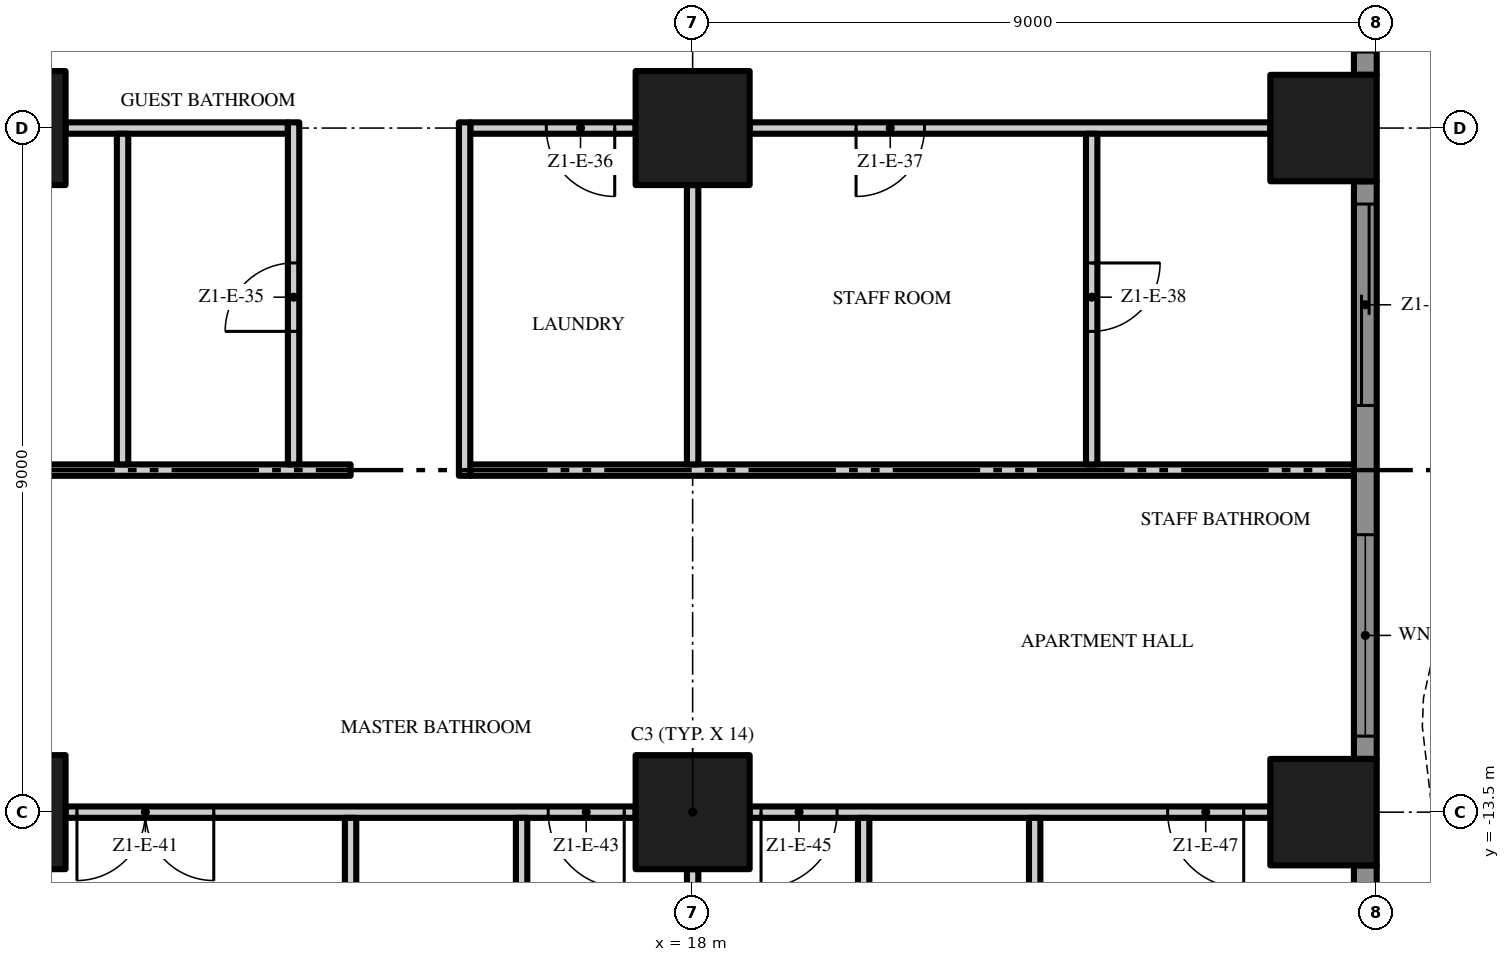
"""IFC4 building model, lengths in metres.
Left out: names, types, materials, properties, quantities, classifications, styles, units other than length and angle.
Written with IfcOpenShell. Run it as: python <this file> out.ifc"""

import sys

from ifc_helpers import new_model, si_unit, direction, frame, frame_2d, origin, origin_2d, place, context, subcontext, project, spatial, polyline, rectangle, outline, extrude, element, fill, save


model = new_model("IFC4")
c1 = context("Model", 3, precision=1e-05, world=origin(), true_north=direction((0.0, 1.0)))
c2 = subcontext(c1, "Body", "Model", "MODEL_VIEW")
j1 = project(units=[si_unit("LENGTHUNIT", "METRE"), si_unit("PLANEANGLEUNIT", "RADIAN")], contexts=[c1])
p1 = place(None, origin())
s1 = spatial("IfcSite", under=j1, at=p1, CompositionType="ELEMENT")
p2 = place(p1, origin())
s2 = spatial("IfcBuilding", under=s1, at=p2, CompositionType="ELEMENT")
p3 = place(p2, frame((0.0, 0.0, 56.8)))
s3 = spatial("IfcBuildingStorey", under=s2, at=p3, CompositionType="ELEMENT", Elevation=56.8)
for number, where, z_axis, x_axis in (
    (1, (18.0, -13.5, 0.0), (0.0, 0.0, 1.0), (1.0, 0.0, 0.0)),
    (2, (18.0, -4.5, 0.0), (0.0, 0.0, 1.0), (1.0, 0.0, 0.0)),
):
    element("IfcColumn", number, at=place(p3, frame(where, z_axis=z_axis, x_axis=x_axis)), inside=s3, PredefinedType="COLUMN", context=c2, shape_type="SweptSolid", body=[
        extrude(rectangle(XDim=1.5, YDim=1.5, at=origin_2d()), origin(), (0.0, 0.0, 1.0), 3.5),
    ])
for number, where, z_axis, x_axis in (
    (3, (26.3, -13.5, 0.0), (0.0, 0.0, 1.0), (1.0, 0.0, 0.0)),
    (4, (26.3, -4.5, 0.0), (0.0, 0.0, 1.0), (1.0, 0.0, 0.0)),
):
    element("IfcColumn", number, at=place(p3, frame(where, z_axis=z_axis, x_axis=x_axis)), inside=s3, PredefinedType="COLUMN", context=c2, shape_type="SweptSolid", body=[
        extrude(rectangle(XDim=1.4, YDim=1.4, at=origin_2d()), origin(), (0.0, 0.0, 1.0), 3.5),
    ])
for number, where, z_axis, x_axis in (
    (5, (9.0, -13.5, 0.0), (0.0, 0.0, 1.0), (1.0, 0.0, 0.0)),
    (6, (9.0, -4.5, 0.0), (0.0, 0.0, 1.0), (1.0, 0.0, 0.0)),
):
    element("IfcColumn", number, at=place(p3, frame(where, z_axis=z_axis, x_axis=x_axis)), inside=s3, PredefinedType="COLUMN", context=c2, shape_type="SweptSolid", body=[
        extrude(rectangle(XDim=1.5, YDim=1.5, at=origin_2d()), origin(), (0.0, 0.0, 1.0), 3.5),
    ])
p4 = place(p3, frame((26.85, -14.2, 0.0), z_axis=(0.0, 0.0, 1.0), x_axis=(0.0, -1.0, 0.0)))
e7 = element("IfcWall", 7, at=p4, inside=s3, PredefinedType="SOLIDWALL", context=c2, shape_type="SweptSolid", body=[
    extrude(rectangle(XDim=3.5, YDim=0.3, at=frame_2d((1.75, 0.0))), origin(), (0.0, 0.0, 1.0), 3.5),
])
p5 = place(p4, frame((0.3, 0.0, 0.45)))
e8 = element("IfcOpeningElement", 8, at=p5, cuts=e7, PredefinedType="OPENING", context=c2, shape_type="SweptSolid", body=[
    extrude(rectangle(XDim=2.65, YDim=2.65, at=frame_2d((1.325, 1.325))), frame((0.0, 0.16, 0.0), z_axis=(0.0, -1.0, 0.0), x_axis=(1.0, 0.0, 0.0)), (0.0, 0.0, 1.0), 0.32),
])
p6 = place(p3, frame((26.85, -5.2, 0.0), z_axis=(0.0, 0.0, 1.0), x_axis=(0.0, -1.0, 0.0)))
e9 = element("IfcWall", 9, at=p6, inside=s3, PredefinedType="SOLIDWALL", context=c2, shape_type="SweptSolid", body=[
    extrude(rectangle(XDim=7.6, YDim=0.3, at=frame_2d((3.8, 0.0))), origin(), (0.0, 0.0, 1.0), 3.5),
])
p7 = place(p6, frame((4.65, 0.0, 0.45)))
e10 = element("IfcOpeningElement", 10, at=p7, cuts=e9, PredefinedType="OPENING", context=c2, shape_type="SweptSolid", body=[
    extrude(rectangle(XDim=2.65, YDim=2.65, at=frame_2d((1.325, 1.325))), frame((0.0, 0.16, 0.0), z_axis=(0.0, -1.0, 0.0), x_axis=(1.0, 0.0, 0.0)), (0.0, 0.0, 1.0), 0.32),
])
p8 = place(p6, frame((0.3, 0.0, 0.0)))
e11 = element("IfcOpeningElement", 11, at=p8, cuts=e9, PredefinedType="OPENING", context=c2, shape_type="SweptSolid", body=[
    extrude(rectangle(XDim=2.65, YDim=2.4, at=frame_2d((1.325, 1.2))), frame((0.0, 0.16, 0.0), z_axis=(0.0, -1.0, 0.0), x_axis=(1.0, 0.0, 0.0)), (0.0, 0.0, 1.0), 0.32),
])
p9 = place(p3, frame((26.85, 3.8, 0.0), z_axis=(0.0, 0.0, 1.0), x_axis=(0.0, -1.0, 0.0)))
e12 = element("IfcWall", 12, at=p9, inside=s3, PredefinedType="SOLIDWALL", context=c2, shape_type="SweptSolid", body=[
    extrude(rectangle(XDim=7.6, YDim=0.3, at=frame_2d((3.8, 0.0))), origin(), (0.0, 0.0, 1.0), 3.5),
])
p10 = place(p9, frame((4.65, 0.0, 0.0)))
e13 = element("IfcOpeningElement", 13, at=p10, cuts=e12, PredefinedType="OPENING", context=c2, shape_type="SweptSolid", body=[
    extrude(rectangle(XDim=2.65, YDim=2.4, at=frame_2d((1.325, 1.2))), frame((0.0, 0.16, 0.0), z_axis=(0.0, -1.0, 0.0), x_axis=(1.0, 0.0, 0.0)), (0.0, 0.0, 1.0), 0.32),
])
p11 = place(p9, frame((0.3, 0.0, 0.45)))
e14 = element("IfcOpeningElement", 14, at=p11, cuts=e12, PredefinedType="OPENING", context=c2, shape_type="SweptSolid", body=[
    extrude(rectangle(XDim=2.65, YDim=2.65, at=frame_2d((1.325, 1.325))), frame((0.0, 0.16, 0.0), z_axis=(0.0, -1.0, 0.0), x_axis=(1.0, 0.0, 0.0)), (0.0, 0.0, 1.0), 0.32),
])
p12 = place(p3, origin())
e15 = element("IfcWall", 15, at=p12, inside=s3, PredefinedType="USERDEFINED", context=c2, shape_type="SweptSolid", body=[
    extrude(outline(polyline([(29.649, -18.0), (28.988, -16.5), (28.255, -15.0), (27.731, -13.5), (27.6, -12.375), (27.615, -12.0), (27.951, -10.5), (28.612, -9.0), (29.345, -7.5), (29.869, -6.0), (30.0, -4.875), (29.985, -4.5), (29.649, -3.0), (28.988, -1.5), (28.255, 0.0), (27.731, 1.5), (27.6, 2.625), (27.615, 3.0), (27.951, 4.5), (28.612, 6.0), (29.345, 7.5), (29.869, 9.0), (30.0, 10.125), (29.985, 10.5), (29.649, 12.0), (28.988, 13.5), (28.255, 15.0), (27.731, 16.5), (27.6, 17.625), (27.615, 18.0), (27.365, 18.01), (27.349, 17.615), (27.486, 16.444), (28.024, 14.904), (28.761, 13.395), (29.41, 11.921), (29.736, 10.467), (29.749, 10.135), (29.624, 9.056), (29.114, 7.596), (28.385, 6.105), (27.713, 4.579), (27.366, 3.033), (27.349, 2.615), (27.486, 1.444), (28.024, -0.096), (28.761, -1.605), (29.41, -3.079), (29.736, -4.533), (29.749, -4.865), (29.624, -5.944), (29.114, -7.404), (28.385, -8.895), (27.713, -10.421), (27.366, -11.967), (27.349, -12.385), (27.486, -13.556), (28.024, -15.096), (28.761, -16.605), (29.42, -18.101), (29.649, -18.0)])), origin(), (0.0, 0.0, 1.0), 0.9),
])
p13 = place(p3, frame((17.25, -13.5, 0.0), z_axis=(0.0, 0.0, 1.0), x_axis=(-1.0, 0.0, 0.0)))
e16 = element("IfcWall", 16, at=p13, inside=s3, PredefinedType="PARTITIONING", context=c2, shape_type="SweptSolid", body=[
    extrude(rectangle(XDim=7.5, YDim=0.15, at=frame_2d((3.75, 0.0))), origin(), (0.0, 0.0, 1.0), 3.5),
])
p14 = place(p13, frame((5.55, 0.0, 0.0)))
e17 = element("IfcOpeningElement", 17, at=p14, cuts=e16, PredefinedType="OPENING", context=c2, shape_type="SweptSolid", body=[
    extrude(rectangle(XDim=1.8, YDim=2.4, at=frame_2d((0.9, 1.2))), frame((0.0, 0.085, 0.0), z_axis=(0.0, -1.0, 0.0), x_axis=(1.0, 0.0, 0.0)), (0.0, 0.0, 1.0), 0.17),
])
p15 = place(p13, frame((0.15, 0.0, 0.0)))
e18 = element("IfcOpeningElement", 18, at=p15, cuts=e16, PredefinedType="OPENING", context=c2, shape_type="SweptSolid", body=[
    extrude(rectangle(XDim=1.0, YDim=2.4, at=frame_2d((0.5, 1.2))), frame((0.0, 0.085, 0.0), z_axis=(0.0, -1.0, 0.0), x_axis=(1.0, 0.0, 0.0)), (0.0, 0.0, 1.0), 0.17),
])
p16 = place(p3, frame((25.6, -13.5, 0.0), z_axis=(0.0, 0.0, 1.0), x_axis=(-1.0, 0.0, 0.0)))
e19 = element("IfcWall", 19, at=p16, inside=s3, PredefinedType="PARTITIONING", context=c2, shape_type="SweptSolid", body=[
    extrude(rectangle(XDim=6.85, YDim=0.15, at=frame_2d((3.425, 0.0))), origin(), (0.0, 0.0, 1.0), 3.5),
])
p17 = place(p16, frame((5.7, 0.0, 0.0)))
e20 = element("IfcOpeningElement", 20, at=p17, cuts=e19, PredefinedType="OPENING", context=c2, shape_type="SweptSolid", body=[
    extrude(rectangle(XDim=1.0, YDim=2.4, at=frame_2d((0.5, 1.2))), frame((0.0, 0.085, 0.0), z_axis=(0.0, -1.0, 0.0), x_axis=(1.0, 0.0, 0.0)), (0.0, 0.0, 1.0), 0.17),
])
p18 = place(p16, frame((0.35, 0.0, 0.0)))
e21 = element("IfcOpeningElement", 21, at=p18, cuts=e19, PredefinedType="OPENING", context=c2, shape_type="SweptSolid", body=[
    extrude(rectangle(XDim=1.0, YDim=2.4, at=frame_2d((0.5, 1.2))), frame((0.0, 0.085, 0.0), z_axis=(0.0, -1.0, 0.0), x_axis=(1.0, 0.0, 0.0)), (0.0, 0.0, 1.0), 0.17),
])
p19 = place(p3, frame((0.1, -9.0, 0.0), z_axis=(0.0, 0.0, 1.0), x_axis=(1.0, 0.0, 0.0)))
e22 = element("IfcWall", 22, at=p19, inside=s3, PredefinedType="PARTITIONING", context=c2, shape_type="SweptSolid", body=[
    extrude(rectangle(XDim=13.4, YDim=0.15, at=frame_2d((6.7, 0.0))), origin(), (0.0, 0.0, 1.0), 3.5),
])
p20 = place(p19, frame((0.4, 0.0, 0.0)))
e23 = element("IfcOpeningElement", 23, at=p20, cuts=e22, PredefinedType="OPENING", context=c2, shape_type="SweptSolid", body=[
    extrude(rectangle(XDim=0.8, YDim=2.0, at=frame_2d((0.4, 1.0))), frame((0.0, 0.085, 0.0), z_axis=(0.0, -1.0, 0.0), x_axis=(1.0, 0.0, 0.0)), (0.0, 0.0, 1.0), 0.17),
])
p21 = place(p19, frame((6.9, 0.0, 0.0)))
e24 = element("IfcOpeningElement", 24, at=p21, cuts=e22, PredefinedType="OPENING", context=c2, shape_type="SweptSolid", body=[
    extrude(rectangle(XDim=1.0, YDim=2.4, at=frame_2d((0.5, 1.2))), frame((0.0, 0.085, 0.0), z_axis=(0.0, -1.0, 0.0), x_axis=(1.0, 0.0, 0.0)), (0.0, 0.0, 1.0), 0.17),
])
p22 = place(p3, frame((15.075, -9.0, 0.0), z_axis=(0.0, 0.0, 1.0), x_axis=(1.0, 0.0, 0.0)))
e25 = element("IfcWall", 25, at=p22, inside=s3, PredefinedType="PARTITIONING", context=c2, shape_type="SweptSolid", body=[
    extrude(rectangle(XDim=11.625, YDim=0.15, at=frame_2d((5.812, 0.0))), origin(), (0.0, 0.0, 1.0), 3.5),
])
p23 = place(p3, frame((9.75, -4.5, 0.0), z_axis=(0.0, 0.0, 1.0), x_axis=(1.0, 0.0, 0.0)))
e26 = element("IfcWall", 26, at=p23, inside=s3, PredefinedType="PARTITIONING", context=c2, shape_type="SweptSolid", body=[
    extrude(rectangle(XDim=2.925, YDim=0.15, at=frame_2d((1.462, 0.0))), origin(), (0.0, 0.0, 1.0), 3.5),
])
p24 = place(p3, frame((17.25, -4.5, 0.0), z_axis=(0.0, 0.0, 1.0), x_axis=(-1.0, 0.0, 0.0)))
e27 = element("IfcWall", 27, at=p24, inside=s3, PredefinedType="PARTITIONING", context=c2, shape_type="SweptSolid", body=[
    extrude(rectangle(XDim=2.175, YDim=0.15, at=frame_2d((1.087, 0.0))), origin(), (0.0, 0.0, 1.0), 3.5),
])
p25 = place(p24, frame((0.275, 0.0, 0.0)))
e28 = element("IfcOpeningElement", 28, at=p25, cuts=e27, PredefinedType="OPENING", context=c2, shape_type="SweptSolid", body=[
    extrude(rectangle(XDim=0.9, YDim=2.1, at=frame_2d((0.45, 1.05))), frame((0.0, 0.085, 0.0), z_axis=(0.0, -1.0, 0.0), x_axis=(1.0, 0.0, 0.0)), (0.0, 0.0, 1.0), 0.17),
])
p26 = place(p3, frame((25.6, -4.5, 0.0), z_axis=(0.0, 0.0, 1.0), x_axis=(-1.0, 0.0, 0.0)))
e29 = element("IfcWall", 29, at=p26, inside=s3, PredefinedType="PARTITIONING", context=c2, shape_type="SweptSolid", body=[
    extrude(rectangle(XDim=6.85, YDim=0.15, at=frame_2d((3.425, 0.0))), origin(), (0.0, 0.0, 1.0), 3.5),
])
p27 = place(p26, frame((4.55, 0.0, 0.0)))
e30 = element("IfcOpeningElement", 30, at=p27, cuts=e29, PredefinedType="OPENING", context=c2, shape_type="SweptSolid", body=[
    extrude(rectangle(XDim=0.9, YDim=2.1, at=frame_2d((0.45, 1.05))), frame((0.0, 0.085, 0.0), z_axis=(0.0, -1.0, 0.0), x_axis=(1.0, 0.0, 0.0)), (0.0, 0.0, 1.0), 0.17),
])
p28 = place(p3, frame((10.5, -8.925, 0.0), z_axis=(0.0, 0.0, 1.0), x_axis=(0.0, 1.0, 0.0)))
e31 = element("IfcWall", 31, at=p28, inside=s3, PredefinedType="PARTITIONING", context=c2, shape_type="SweptSolid", body=[
    extrude(rectangle(XDim=4.35, YDim=0.15, at=frame_2d((2.175, 0.0))), origin(), (0.0, 0.0, 1.0), 3.5),
])
p29 = place(p3, frame((12.75, -8.925, 0.0), z_axis=(0.0, 0.0, 1.0), x_axis=(0.0, 1.0, 0.0)))
e32 = element("IfcWall", 32, at=p29, inside=s3, PredefinedType="PARTITIONING", context=c2, shape_type="SweptSolid", body=[
    extrude(rectangle(XDim=4.5, YDim=0.15, at=frame_2d((2.25, 0.0))), origin(), (0.0, 0.0, 1.0), 3.5),
])
p30 = place(p29, frame((1.75, 0.0, 0.0)))
e33 = element("IfcOpeningElement", 33, at=p30, cuts=e32, PredefinedType="OPENING", context=c2, shape_type="SweptSolid", body=[
    extrude(rectangle(XDim=0.9, YDim=2.1, at=frame_2d((0.45, 1.05))), frame((0.0, 0.085, 0.0), z_axis=(0.0, -1.0, 0.0), x_axis=(1.0, 0.0, 0.0)), (0.0, 0.0, 1.0), 0.17),
])
p31 = place(p3, frame((13.5, -22.2, 0.0), z_axis=(0.0, 0.0, 1.0), x_axis=(0.0, 1.0, 0.0)))
e34 = element("IfcWall", 34, at=p31, inside=s3, PredefinedType="PARTITIONING", context=c2, shape_type="SweptSolid", body=[
    extrude(rectangle(XDim=8.625, YDim=0.15, at=frame_2d((4.312, 0.0))), origin(), (0.0, 0.0, 1.0), 3.5),
])
p32 = place(p3, frame((15.0, -9.075, 0.0), z_axis=(0.0, 0.0, 1.0), x_axis=(0.0, 1.0, 0.0)))
e35 = element("IfcWall", 35, at=p32, inside=s3, PredefinedType="PARTITIONING", context=c2, shape_type="SweptSolid", body=[
    extrude(rectangle(XDim=4.65, YDim=0.15, at=frame_2d((2.325, 0.0))), origin(), (0.0, 0.0, 1.0), 3.5),
])
p33 = place(p3, frame((15.75, -16.575, 0.0), z_axis=(0.0, 0.0, 1.0), x_axis=(0.0, 1.0, 0.0)))
e36 = element("IfcWall", 36, at=p33, inside=s3, PredefinedType="PARTITIONING", context=c2, shape_type="SweptSolid", body=[
    extrude(rectangle(XDim=3.0, YDim=0.15, at=frame_2d((1.5, 0.0))), origin(), (0.0, 0.0, 1.0), 3.5),
])
p34 = place(p3, frame((18.0, -21.1, 0.0), z_axis=(0.0, 0.0, 1.0), x_axis=(0.0, 1.0, 0.0)))
e37 = element("IfcWall", 37, at=p34, inside=s3, PredefinedType="PARTITIONING", context=c2, shape_type="SweptSolid", body=[
    extrude(rectangle(XDim=6.85, YDim=0.15, at=frame_2d((3.425, 0.0))), origin(), (0.0, 0.0, 1.0), 3.5),
])
p35 = place(p3, frame((18.0, -8.925, 0.0), z_axis=(0.0, 0.0, 1.0), x_axis=(0.0, 1.0, 0.0)))
e38 = element("IfcWall", 38, at=p35, inside=s3, PredefinedType="PARTITIONING", context=c2, shape_type="SweptSolid", body=[
    extrude(rectangle(XDim=3.675, YDim=0.15, at=frame_2d((1.837, 0.0))), origin(), (0.0, 0.0, 1.0), 3.5),
])
p36 = place(p3, frame((20.25, -16.575, 0.0), z_axis=(0.0, 0.0, 1.0), x_axis=(0.0, 1.0, 0.0)))
e39 = element("IfcWall", 39, at=p36, inside=s3, PredefinedType="PARTITIONING", context=c2, shape_type="SweptSolid", body=[
    extrude(rectangle(XDim=3.0, YDim=0.15, at=frame_2d((1.5, 0.0))), origin(), (0.0, 0.0, 1.0), 3.5),
])
p37 = place(p3, frame((22.5, -17.3, 0.0), z_axis=(0.0, 0.0, 1.0), x_axis=(0.0, 1.0, 0.0)))
e40 = element("IfcWall", 40, at=p37, inside=s3, PredefinedType="PARTITIONING", context=c2, shape_type="SweptSolid", body=[
    extrude(rectangle(XDim=3.725, YDim=0.15, at=frame_2d((1.863, 0.0))), origin(), (0.0, 0.0, 1.0), 3.5),
])
p38 = place(p3, frame((23.25, -4.575, 0.0), z_axis=(0.0, 0.0, 1.0), x_axis=(0.0, -1.0, 0.0)))
e41 = element("IfcWall", 41, at=p38, inside=s3, PredefinedType="PARTITIONING", context=c2, shape_type="SweptSolid", body=[
    extrude(rectangle(XDim=4.35, YDim=0.15, at=frame_2d((2.175, 0.0))), origin(), (0.0, 0.0, 1.0), 3.5),
])
p39 = place(p38, frame((1.7, 0.0, 0.0)))
e42 = element("IfcOpeningElement", 42, at=p39, cuts=e41, PredefinedType="OPENING", context=c2, shape_type="SweptSolid", body=[
    extrude(rectangle(XDim=0.9, YDim=2.1, at=frame_2d((0.45, 1.05))), frame((0.0, 0.085, 0.0), z_axis=(0.0, -1.0, 0.0), x_axis=(1.0, 0.0, 0.0)), (0.0, 0.0, 1.0), 0.17),
])
p40 = place(p7, origin())
e43 = element("IfcWindow", 43, at=p40, inside=s3, PartitioningType="SINGLE_PANEL", PredefinedType="WINDOW", context=c2, shape_type="SweptSolid", body=[
    extrude(rectangle(XDim=2.65, YDim=2.65, at=frame_2d((1.325, 1.325))), frame((0.0, 0.03, 0.0), z_axis=(0.0, -1.0, 0.0), x_axis=(1.0, 0.0, 0.0)), (0.0, 0.0, 1.0), 0.06),
])
fill(e10, e43)
p41 = place(p8, origin())
e44 = element("IfcDoor", 44, at=p41, inside=s3, OperationType="SINGLE_SWING_LEFT", PredefinedType="DOOR", context=c2, shape_type="SweptSolid", body=[
    extrude(rectangle(XDim=2.65, YDim=2.4, at=frame_2d((1.325, 1.2))), frame((0.0, 0.025, 0.0), z_axis=(0.0, -1.0, 0.0), x_axis=(1.0, 0.0, 0.0)), (0.0, 0.0, 1.0), 0.05),
])
fill(e11, e44)
p42 = place(p10, origin())
e45 = element("IfcDoor", 45, at=p42, inside=s3, OperationType="SINGLE_SWING_LEFT", PredefinedType="DOOR", context=c2, shape_type="SweptSolid", body=[
    extrude(rectangle(XDim=2.65, YDim=2.4, at=frame_2d((1.325, 1.2))), frame((0.0, 0.025, 0.0), z_axis=(0.0, -1.0, 0.0), x_axis=(1.0, 0.0, 0.0)), (0.0, 0.0, 1.0), 0.05),
])
fill(e13, e45)
p43 = place(p30, origin())
e46 = element("IfcDoor", 46, at=p43, inside=s3, OperationType="SINGLE_SWING_LEFT", PredefinedType="DOOR", context=c2, shape_type="SweptSolid", body=[
    extrude(rectangle(XDim=0.9, YDim=2.1, at=frame_2d((0.45, 1.05))), frame((0.0, 0.025, 0.0), z_axis=(0.0, -1.0, 0.0), x_axis=(1.0, 0.0, 0.0)), (0.0, 0.0, 1.0), 0.05),
])
fill(e33, e46)
p44 = place(p25, origin())
e47 = element("IfcDoor", 47, at=p44, inside=s3, OperationType="SINGLE_SWING_LEFT", PredefinedType="DOOR", context=c2, shape_type="SweptSolid", body=[
    extrude(rectangle(XDim=0.9, YDim=2.1, at=frame_2d((0.45, 1.05))), frame((0.0, 0.025, 0.0), z_axis=(0.0, -1.0, 0.0), x_axis=(1.0, 0.0, 0.0)), (0.0, 0.0, 1.0), 0.05),
])
fill(e28, e47)
p45 = place(p27, origin())
e48 = element("IfcDoor", 48, at=p45, inside=s3, OperationType="SINGLE_SWING_RIGHT", PredefinedType="DOOR", context=c2, shape_type="SweptSolid", body=[
    extrude(rectangle(XDim=0.9, YDim=2.1, at=frame_2d((0.45, 1.05))), frame((0.0, 0.025, 0.0), z_axis=(0.0, -1.0, 0.0), x_axis=(1.0, 0.0, 0.0)), (0.0, 0.0, 1.0), 0.05),
])
fill(e30, e48)
p46 = place(p39, origin())
e49 = element("IfcDoor", 49, at=p46, inside=s3, OperationType="SINGLE_SWING_LEFT", PredefinedType="DOOR", context=c2, shape_type="SweptSolid", body=[
    extrude(rectangle(XDim=0.9, YDim=2.1, at=frame_2d((0.45, 1.05))), frame((0.0, 0.025, 0.0), z_axis=(0.0, -1.0, 0.0), x_axis=(1.0, 0.0, 0.0)), (0.0, 0.0, 1.0), 0.05),
])
fill(e42, e49)
p47 = place(p14, origin())
e50 = element("IfcDoor", 50, at=p47, inside=s3, OperationType="DOUBLE_DOOR_SINGLE_SWING", PredefinedType="DOOR", context=c2, shape_type="SweptSolid", body=[
    extrude(rectangle(XDim=1.8, YDim=2.4, at=frame_2d((0.9, 1.2))), frame((0.0, 0.025, 0.0), z_axis=(0.0, -1.0, 0.0), x_axis=(1.0, 0.0, 0.0)), (0.0, 0.0, 1.0), 0.05),
])
fill(e17, e50)
p48 = place(p15, origin())
e51 = element("IfcDoor", 51, at=p48, inside=s3, OperationType="SINGLE_SWING_LEFT", PredefinedType="DOOR", context=c2, shape_type="SweptSolid", body=[
    extrude(rectangle(XDim=1.0, YDim=2.4, at=frame_2d((0.5, 1.2))), frame((0.0, 0.025, 0.0), z_axis=(0.0, -1.0, 0.0), x_axis=(1.0, 0.0, 0.0)), (0.0, 0.0, 1.0), 0.05),
])
fill(e18, e51)
p49 = place(p17, origin())
e52 = element("IfcDoor", 52, at=p49, inside=s3, OperationType="SINGLE_SWING_RIGHT", PredefinedType="DOOR", context=c2, shape_type="SweptSolid", body=[
    extrude(rectangle(XDim=1.0, YDim=2.4, at=frame_2d((0.5, 1.2))), frame((0.0, 0.025, 0.0), z_axis=(0.0, -1.0, 0.0), x_axis=(1.0, 0.0, 0.0)), (0.0, 0.0, 1.0), 0.05),
])
fill(e20, e52)
p50 = place(p18, origin())
e53 = element("IfcDoor", 53, at=p50, inside=s3, OperationType="SINGLE_SWING_LEFT", PredefinedType="DOOR", context=c2, shape_type="SweptSolid", body=[
    extrude(rectangle(XDim=1.0, YDim=2.4, at=frame_2d((0.5, 1.2))), frame((0.0, 0.025, 0.0), z_axis=(0.0, -1.0, 0.0), x_axis=(1.0, 0.0, 0.0)), (0.0, 0.0, 1.0), 0.05),
])
fill(e21, e53)
save(model, sys.argv[1])
